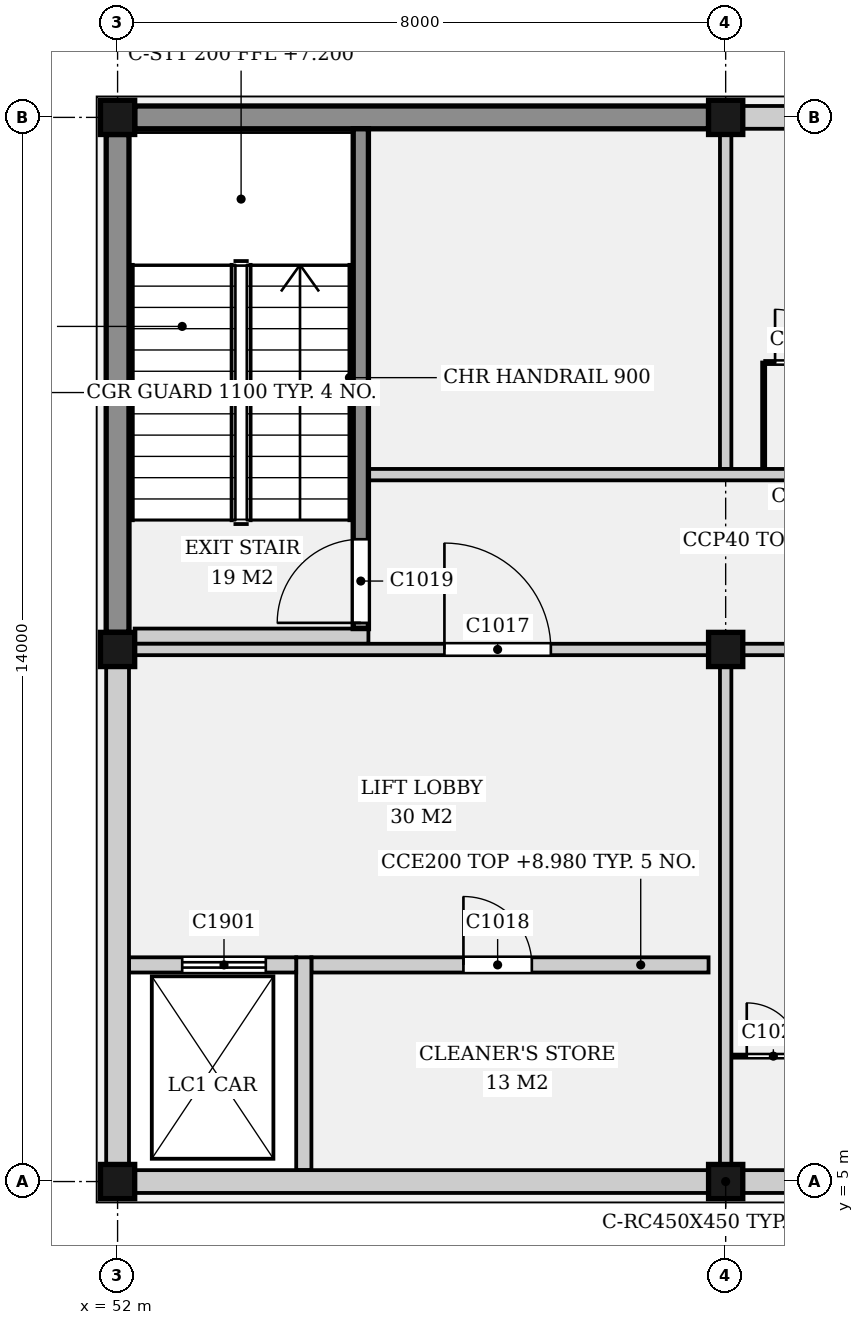
"""IFC4 building model, lengths in metres.
Left out: names, types, materials, properties, quantities, classifications, styles, units other than length and angle.
Written with IfcOpenShell. Run it as: python <this file> out.ifc"""

import sys

from ifc_helpers import new_model, si_unit, direction, frame, frame_2d, origin, origin_2d, place, context, subcontext, project, spatial, rectangle, extrude, element, fill, save


model = new_model("IFC4")
c1 = context("Model", 3, precision=1e-05, world=origin(), true_north=direction((0.0, 1.0)))
c2 = subcontext(c1, "Body", "Model", "MODEL_VIEW")
j1 = project(units=[si_unit("LENGTHUNIT", "METRE"), si_unit("PLANEANGLEUNIT", "RADIAN")], contexts=[c1])
p1 = place(None, origin())
s1 = spatial("IfcSite", under=j1, at=p1, CompositionType="ELEMENT")
p2 = place(p1, origin())
s2 = spatial("IfcBuilding", under=s1, at=p2, CompositionType="ELEMENT")
p3 = place(p2, frame((0.0, 0.0, 5.0)))
s3 = spatial("IfcBuildingStorey", under=s2, at=p3, CompositionType="ELEMENT", Elevation=5.0)
for number, where, z_axis, x_axis in (
    (1, (52.0, 5.0, 0.0), (0.0, 0.0, 1.0), (1.0, 0.0, 0.0)),
    (2, (52.0, 12.0, 0.0), (0.0, 0.0, 1.0), (1.0, 0.0, 0.0)),
    (3, (52.0, 19.0, 0.0), (0.0, 0.0, 1.0), (1.0, 0.0, 0.0)),
    (4, (60.0, 5.0, 0.0), (0.0, 0.0, 1.0), (1.0, 0.0, 0.0)),
    (5, (60.0, 12.0, 0.0), (0.0, 0.0, 1.0), (1.0, 0.0, 0.0)),
    (6, (60.0, 19.0, 0.0), (0.0, 0.0, 1.0), (1.0, 0.0, 0.0)),
):
    element("IfcColumn", number, at=place(p3, frame(where, z_axis=z_axis, x_axis=x_axis)), inside=s3, PredefinedType="COLUMN", context=c2, shape_type="SweptSolid", body=[
        extrude(rectangle(XDim=0.45, YDim=0.45, at=origin_2d()), origin(), (0.0, 0.0, 1.0), 4.4),
    ])
p4 = place(p3, frame((52.225, 5.0, 0.0), z_axis=(0.0, 0.0, 1.0), x_axis=(1.0, 0.0, 0.0)))
e7 = element("IfcWall", 7, at=p4, inside=s3, PredefinedType="ELEMENTEDWALL", context=c2, shape_type="SweptSolid", body=[
    extrude(rectangle(XDim=7.55, YDim=0.3, at=frame_2d((3.775, 0.0))), origin(), (0.0, 0.0, 1.0), 3.98),
])
p5 = place(p3, frame((60.225, 5.0, 0.0), z_axis=(0.0, 0.0, 1.0), x_axis=(1.0, 0.0, 0.0)))
e8 = element("IfcWall", 8, at=p5, inside=s3, PredefinedType="ELEMENTEDWALL", context=c2, shape_type="SweptSolid", body=[
    extrude(rectangle(XDim=11.55, YDim=0.3, at=frame_2d((5.775, 0.0))), origin(), (0.0, 0.0, 1.0), 3.98),
])
p6 = place(p5, frame((1.458, 0.0, 1.4)))
e9 = element("IfcOpeningElement", 9, at=p6, cuts=e8, PredefinedType="OPENING", context=c2, shape_type="SweptSolid", body=[
    extrude(rectangle(XDim=1.6, YDim=1.2, at=frame_2d((0.8, 0.6))), frame((0.0, 0.16, 0.0), z_axis=(0.0, -1.0, 0.0), x_axis=(1.0, 0.0, 0.0)), (0.0, 0.0, 1.0), 0.32),
])
p7 = place(p5, frame((4.975, 0.0, 1.4)))
e10 = element("IfcOpeningElement", 10, at=p7, cuts=e8, PredefinedType="OPENING", context=c2, shape_type="SweptSolid", body=[
    extrude(rectangle(XDim=1.6, YDim=1.2, at=frame_2d((0.8, 0.6))), frame((0.0, 0.16, 0.0), z_axis=(0.0, -1.0, 0.0), x_axis=(1.0, 0.0, 0.0)), (0.0, 0.0, 1.0), 0.32),
])
p8 = place(p5, frame((8.492, 0.0, 1.4)))
e11 = element("IfcOpeningElement", 11, at=p8, cuts=e8, PredefinedType="OPENING", context=c2, shape_type="SweptSolid", body=[
    extrude(rectangle(XDim=1.6, YDim=1.2, at=frame_2d((0.8, 0.6))), frame((0.0, 0.16, 0.0), z_axis=(0.0, -1.0, 0.0), x_axis=(1.0, 0.0, 0.0)), (0.0, 0.0, 1.0), 0.32),
])
p9 = place(p3, frame((52.225, 19.0, 0.0), z_axis=(0.0, 0.0, 1.0), x_axis=(1.0, 0.0, 0.0)))
e12 = element("IfcWall", 12, at=p9, inside=s3, PredefinedType="ELEMENTEDWALL", context=c2, shape_type="SweptSolid", body=[
    extrude(rectangle(XDim=7.55, YDim=0.3, at=frame_2d((3.775, 0.0))), origin(), (0.0, 0.0, 1.0), 3.98),
])
p10 = place(p3, frame((60.225, 19.0, 0.0), z_axis=(0.0, 0.0, 1.0), x_axis=(1.0, 0.0, 0.0)))
e13 = element("IfcWall", 13, at=p10, inside=s3, PredefinedType="ELEMENTEDWALL", context=c2, shape_type="SweptSolid", body=[
    extrude(rectangle(XDim=11.55, YDim=0.3, at=frame_2d((5.775, 0.0))), origin(), (0.0, 0.0, 1.0), 3.98),
])
p11 = place(p10, frame((1.458, 0.0, 1.4)))
e14 = element("IfcOpeningElement", 14, at=p11, cuts=e13, PredefinedType="OPENING", context=c2, shape_type="SweptSolid", body=[
    extrude(rectangle(XDim=1.6, YDim=1.2, at=frame_2d((0.8, 0.6))), frame((0.0, 0.16, 0.0), z_axis=(0.0, -1.0, 0.0), x_axis=(1.0, 0.0, 0.0)), (0.0, 0.0, 1.0), 0.32),
])
p12 = place(p10, frame((4.975, 0.0, 1.4)))
e15 = element("IfcOpeningElement", 15, at=p12, cuts=e13, PredefinedType="OPENING", context=c2, shape_type="SweptSolid", body=[
    extrude(rectangle(XDim=1.6, YDim=1.2, at=frame_2d((0.8, 0.6))), frame((0.0, 0.16, 0.0), z_axis=(0.0, -1.0, 0.0), x_axis=(1.0, 0.0, 0.0)), (0.0, 0.0, 1.0), 0.32),
])
p13 = place(p10, frame((8.492, 0.0, 1.4)))
e16 = element("IfcOpeningElement", 16, at=p13, cuts=e13, PredefinedType="OPENING", context=c2, shape_type="SweptSolid", body=[
    extrude(rectangle(XDim=1.6, YDim=1.2, at=frame_2d((0.8, 0.6))), frame((0.0, 0.16, 0.0), z_axis=(0.0, -1.0, 0.0), x_axis=(1.0, 0.0, 0.0)), (0.0, 0.0, 1.0), 0.32),
])
for number, where, z_axis, x_axis in (
    (17, (52.0, 5.225, 0.0), (0.0, 0.0, 1.0), (0.0, 1.0, 0.0)),
    (18, (52.0, 12.225, 0.0), (0.0, 0.0, 1.0), (0.0, 1.0, 0.0)),
):
    element("IfcWall", number, at=place(p3, frame(where, z_axis=z_axis, x_axis=x_axis)), inside=s3, PredefinedType="ELEMENTEDWALL", context=c2, shape_type="SweptSolid", body=[
        extrude(rectangle(XDim=6.55, YDim=0.3, at=frame_2d((3.275, 0.0))), origin(), (0.0, 0.0, 1.0), 3.98),
    ])
p14 = place(p3, frame((54.45, 5.15, 0.0), z_axis=(0.0, 0.0, 1.0), x_axis=(0.0, 1.0, 0.0)))
e19 = element("IfcWall", 19, at=p14, inside=s3, PredefinedType="SOLIDWALL", context=c2, shape_type="SweptSolid", body=[
    extrude(rectangle(XDim=2.8, YDim=0.2, at=frame_2d((1.4, 0.0))), origin(), (0.0, 0.0, 1.0), 3.98),
])
p15 = place(p3, frame((52.15, 7.85, 0.0), z_axis=(0.0, 0.0, 1.0), x_axis=(1.0, 0.0, 0.0)))
e20 = element("IfcWall", 20, at=p15, inside=s3, PredefinedType="SOLIDWALL", context=c2, shape_type="SweptSolid", body=[
    extrude(rectangle(XDim=2.2, YDim=0.2, at=frame_2d((1.1, 0.0))), origin(), (0.0, 0.0, 1.0), 3.98),
])
p16 = place(p15, frame((0.7, 0.0, 0.0)))
e21 = element("IfcOpeningElement", 21, at=p16, cuts=e20, PredefinedType="OPENING", context=c2, shape_type="SweptSolid", body=[
    extrude(rectangle(XDim=1.1, YDim=2.1, at=frame_2d((0.55, 1.05))), frame((0.0, 0.11, 0.0), z_axis=(0.0, -1.0, 0.0), x_axis=(1.0, 0.0, 0.0)), (0.0, 0.0, 1.0), 0.22),
])
p17 = place(p3, frame((52.225, 12.0, 0.0), z_axis=(0.0, 0.0, 1.0), x_axis=(1.0, 0.0, 0.0)))
e22 = element("IfcWall", 22, at=p17, inside=s3, PredefinedType="PARTITIONING", context=c2, shape_type="SweptSolid", body=[
    extrude(rectangle(XDim=7.55, YDim=0.15, at=frame_2d((3.775, 0.0))), origin(), (0.0, 0.0, 1.0), 3.98),
])
p18 = place(p17, frame((4.075, 0.0, 0.0)))
e23 = element("IfcOpeningElement", 23, at=p18, cuts=e22, PredefinedType="OPENING", context=c2, shape_type="SweptSolid", body=[
    extrude(rectangle(XDim=1.4, YDim=2.1, at=frame_2d((0.7, 1.05))), frame((0.0, 0.085, 0.0), z_axis=(0.0, -1.0, 0.0), x_axis=(1.0, 0.0, 0.0)), (0.0, 0.0, 1.0), 0.17),
])
p19 = place(p3, frame((60.225, 12.0, 0.0), z_axis=(0.0, 0.0, 1.0), x_axis=(1.0, 0.0, 0.0)))
e24 = element("IfcWall", 24, at=p19, inside=s3, PredefinedType="PARTITIONING", context=c2, shape_type="SweptSolid", body=[
    extrude(rectangle(XDim=11.55, YDim=0.15, at=frame_2d((5.775, 0.0))), origin(), (0.0, 0.0, 1.0), 3.98),
])
p20 = place(p3, frame((55.3, 14.3, 0.0), z_axis=(0.0, 0.0, 1.0), x_axis=(1.0, 0.0, 0.0)))
e25 = element("IfcWall", 25, at=p20, inside=s3, PredefinedType="PARTITIONING", context=c2, shape_type="SweptSolid", body=[
    extrude(rectangle(XDim=93.4, YDim=0.15, at=frame_2d((46.7, 0.0))), origin(), (0.0, 0.0, 1.0), 3.98),
])
p21 = place(p20, frame((15.8, 0.0, 0.0)))
e26 = element("IfcOpeningElement", 26, at=p21, cuts=e25, PredefinedType="OPENING", context=c2, shape_type="SweptSolid", body=[
    extrude(rectangle(XDim=1.8, YDim=2.4, at=frame_2d((0.9, 1.2))), frame((0.0, 0.085, 0.0), z_axis=(0.0, -1.0, 0.0), x_axis=(1.0, 0.0, 0.0)), (0.0, 0.0, 1.0), 0.17),
])
p22 = place(p20, frame((32.2, 0.0, 0.0)))
e27 = element("IfcOpeningElement", 27, at=p22, cuts=e25, PredefinedType="OPENING", context=c2, shape_type="SweptSolid", body=[
    extrude(rectangle(XDim=1.0, YDim=2.1, at=frame_2d((0.5, 1.05))), frame((0.0, 0.085, 0.0), z_axis=(0.0, -1.0, 0.0), x_axis=(1.0, 0.0, 0.0)), (0.0, 0.0, 1.0), 0.17),
])
p23 = place(p20, frame((38.2, 0.0, 0.0)))
e28 = element("IfcOpeningElement", 28, at=p23, cuts=e25, PredefinedType="OPENING", context=c2, shape_type="SweptSolid", body=[
    extrude(rectangle(XDim=1.0, YDim=2.1, at=frame_2d((0.5, 1.05))), frame((0.0, 0.085, 0.0), z_axis=(0.0, -1.0, 0.0), x_axis=(1.0, 0.0, 0.0)), (0.0, 0.0, 1.0), 0.17),
])
p24 = place(p20, frame((45.7, 0.0, 0.0)))
e29 = element("IfcOpeningElement", 29, at=p24, cuts=e25, PredefinedType="OPENING", context=c2, shape_type="SweptSolid", body=[
    extrude(rectangle(XDim=0.9, YDim=2.1, at=frame_2d((0.45, 1.05))), frame((0.0, 0.085, 0.0), z_axis=(0.0, -1.0, 0.0), x_axis=(1.0, 0.0, 0.0)), (0.0, 0.0, 1.0), 0.17),
])
p25 = place(p20, frame((58.2, 0.0, 0.0)))
e30 = element("IfcOpeningElement", 30, at=p25, cuts=e25, PredefinedType="OPENING", context=c2, shape_type="SweptSolid", body=[
    extrude(rectangle(XDim=1.0, YDim=2.1, at=frame_2d((0.5, 1.05))), frame((0.0, 0.085, 0.0), z_axis=(0.0, -1.0, 0.0), x_axis=(1.0, 0.0, 0.0)), (0.0, 0.0, 1.0), 0.17),
])
p26 = place(p20, frame((70.2, 0.0, 0.0)))
e31 = element("IfcOpeningElement", 31, at=p26, cuts=e25, PredefinedType="OPENING", context=c2, shape_type="SweptSolid", body=[
    extrude(rectangle(XDim=1.0, YDim=2.1, at=frame_2d((0.5, 1.05))), frame((0.0, 0.085, 0.0), z_axis=(0.0, -1.0, 0.0), x_axis=(1.0, 0.0, 0.0)), (0.0, 0.0, 1.0), 0.17),
])
p27 = place(p20, frame((81.68, 0.0, 0.0)))
e32 = element("IfcOpeningElement", 32, at=p27, cuts=e25, PredefinedType="OPENING", context=c2, shape_type="SweptSolid", body=[
    extrude(rectangle(XDim=0.9, YDim=2.1, at=frame_2d((0.45, 1.05))), frame((0.0, 0.085, 0.0), z_axis=(0.0, -1.0, 0.0), x_axis=(1.0, 0.0, 0.0)), (0.0, 0.0, 1.0), 0.17),
])
p28 = place(p3, frame((60.0, 5.225, 0.0), z_axis=(0.0, 0.0, 1.0), x_axis=(0.0, 1.0, 0.0)))
e33 = element("IfcWall", 33, at=p28, inside=s3, PredefinedType="PARTITIONING", context=c2, shape_type="SweptSolid", body=[
    extrude(rectangle(XDim=6.55, YDim=0.15, at=frame_2d((3.275, 0.0))), origin(), (0.0, 0.0, 1.0), 3.98),
])
p29 = place(p3, frame((60.0, 14.375, 0.0), z_axis=(0.0, 0.0, 1.0), x_axis=(0.0, 1.0, 0.0)))
e34 = element("IfcWall", 34, at=p29, inside=s3, PredefinedType="PARTITIONING", context=c2, shape_type="SweptSolid", body=[
    extrude(rectangle(XDim=4.4, YDim=0.15, at=frame_2d((2.2, 0.0))), origin(), (0.0, 0.0, 1.0), 3.98),
])
p30 = place(p3, frame((54.55, 7.85, 0.0), z_axis=(0.0, 0.0, 1.0), x_axis=(1.0, 0.0, 0.0)))
e35 = element("IfcWall", 35, at=p30, inside=s3, PredefinedType="SOLIDWALL", context=c2, shape_type="SweptSolid", body=[
    extrude(rectangle(XDim=5.225, YDim=0.2, at=frame_2d((2.612, 0.0))), origin(), (0.0, 0.0, 1.0), 3.98),
])
p31 = place(p30, frame((2.0, 0.0, 0.0)))
e36 = element("IfcOpeningElement", 36, at=p31, cuts=e35, PredefinedType="OPENING", context=c2, shape_type="SweptSolid", body=[
    extrude(rectangle(XDim=0.9, YDim=2.1, at=frame_2d((0.45, 1.05))), frame((0.0, 0.11, 0.0), z_axis=(0.0, -1.0, 0.0), x_axis=(1.0, 0.0, 0.0)), (0.0, 0.0, 1.0), 0.22),
])
p32 = place(p3, frame((55.2, 12.275, 0.0), z_axis=(0.0, 0.0, 1.0), x_axis=(0.0, 1.0, 0.0)))
e37 = element("IfcWall", 37, at=p32, inside=s3, PredefinedType="SOLIDWALL", context=c2, shape_type="SweptSolid", body=[
    extrude(rectangle(XDim=6.575, YDim=0.2, at=frame_2d((3.288, 0.0))), origin(), (0.0, 0.0, 1.0), 3.98),
])
p33 = place(p32, frame((0.075, 0.0, 0.0)))
e38 = element("IfcOpeningElement", 38, at=p33, cuts=e37, PredefinedType="OPENING", context=c2, shape_type="SweptSolid", body=[
    extrude(rectangle(XDim=1.1, YDim=2.1, at=frame_2d((0.55, 1.05))), frame((0.0, 0.11, 0.0), z_axis=(0.0, -1.0, 0.0), x_axis=(1.0, 0.0, 0.0)), (0.0, 0.0, 1.0), 0.22),
])
p34 = place(p3, frame((52.225, 12.175, 0.0), z_axis=(0.0, 0.0, 1.0), x_axis=(1.0, 0.0, 0.0)))
e39 = element("IfcWall", 39, at=p34, inside=s3, PredefinedType="SOLIDWALL", context=c2, shape_type="SweptSolid", body=[
    extrude(rectangle(XDim=3.075, YDim=0.2, at=frame_2d((1.538, 0.0))), origin(), (0.0, 0.0, 1.0), 3.98),
])
p35 = place(p3, frame((60.075, 6.65, 0.0), z_axis=(0.0, 0.0, 1.0), x_axis=(1.0, 0.0, 0.0)))
e40 = element("IfcWall", 40, at=p35, inside=s3, PredefinedType="PARTITIONING", context=c2, shape_type="SweptSolid", body=[
    extrude(rectangle(XDim=1.105, YDim=0.04, at=frame_2d((0.552, 0.0))), origin(), (0.0, 0.0, 1.0), 2.4),
])
p36 = place(p35, frame((0.202, 0.0, 0.0)))
e41 = element("IfcOpeningElement", 41, at=p36, cuts=e40, PredefinedType="OPENING", context=c2, shape_type="SweptSolid", body=[
    extrude(rectangle(XDim=0.7, YDim=2.0, at=frame_2d((0.35, 1.0))), frame((0.0, 0.03, 0.0), z_axis=(0.0, -1.0, 0.0), x_axis=(1.0, 0.0, 0.0)), (0.0, 0.0, 1.0), 0.06),
])
p37 = place(p3, frame((60.5, 14.375, 0.0), z_axis=(0.0, 0.0, 1.0), x_axis=(0.0, 1.0, 0.0)))
e42 = element("IfcWall", 42, at=p37, inside=s3, PredefinedType="PARTITIONING", context=c2, shape_type="SweptSolid", body=[
    extrude(rectangle(XDim=1.4, YDim=0.04, at=frame_2d((0.7, 0.0))), origin(), (0.0, 0.0, 1.0), 2.4),
])
p38 = place(p3, frame((60.52, 15.775, 0.0), z_axis=(0.0, 0.0, 1.0), x_axis=(1.0, 0.0, 0.0)))
e43 = element("IfcWall", 43, at=p38, inside=s3, PredefinedType="PARTITIONING", context=c2, shape_type="SweptSolid", body=[
    extrude(rectangle(XDim=0.96, YDim=0.04, at=frame_2d((0.48, 0.0))), origin(), (0.0, 0.0, 1.0), 2.4),
])
p39 = place(p38, frame((0.13, 0.0, 0.0)))
e44 = element("IfcOpeningElement", 44, at=p39, cuts=e43, PredefinedType="OPENING", context=c2, shape_type="SweptSolid", body=[
    extrude(rectangle(XDim=0.7, YDim=2.0, at=frame_2d((0.35, 1.0))), frame((0.0, 0.03, 0.0), z_axis=(0.0, -1.0, 0.0), x_axis=(1.0, 0.0, 0.0)), (0.0, 0.0, 1.0), 0.06),
])
p40 = place(p16, origin())
e45 = element("IfcDoor", 45, at=p40, inside=s3, OperationType="SLIDING_TO_LEFT", PredefinedType="DOOR", context=c2, shape_type="SweptSolid", body=[
    extrude(rectangle(XDim=1.1, YDim=2.1, at=frame_2d((0.55, 1.05))), frame((0.0, 0.025, 0.0), z_axis=(0.0, -1.0, 0.0), x_axis=(1.0, 0.0, 0.0)), (0.0, 0.0, 1.0), 0.05),
])
fill(e21, e45)
p41 = place(p18, origin())
e46 = element("IfcDoor", 46, at=p41, inside=s3, OperationType="SINGLE_SWING_LEFT", PredefinedType="DOOR", context=c2, shape_type="SweptSolid", body=[
    extrude(rectangle(XDim=1.4, YDim=2.1, at=frame_2d((0.7, 1.05))), frame((0.0, 0.025, 0.0), z_axis=(0.0, -1.0, 0.0), x_axis=(1.0, 0.0, 0.0)), (0.0, 0.0, 1.0), 0.05),
])
fill(e23, e46)
p42 = place(p31, origin())
e47 = element("IfcDoor", 47, at=p42, inside=s3, OperationType="SINGLE_SWING_LEFT", PredefinedType="DOOR", context=c2, shape_type="SweptSolid", body=[
    extrude(rectangle(XDim=0.9, YDim=2.1, at=frame_2d((0.45, 1.05))), frame((0.0, 0.025, 0.0), z_axis=(0.0, -1.0, 0.0), x_axis=(1.0, 0.0, 0.0)), (0.0, 0.0, 1.0), 0.05),
])
fill(e36, e47)
p43 = place(p33, origin())
e48 = element("IfcDoor", 48, at=p43, inside=s3, OperationType="SINGLE_SWING_LEFT", PredefinedType="DOOR", context=c2, shape_type="SweptSolid", body=[
    extrude(rectangle(XDim=1.1, YDim=2.1, at=frame_2d((0.55, 1.05))), frame((0.0, 0.025, 0.0), z_axis=(0.0, -1.0, 0.0), x_axis=(1.0, 0.0, 0.0)), (0.0, 0.0, 1.0), 0.05),
])
fill(e38, e48)
p44 = place(p36, origin())
e49 = element("IfcDoor", 49, at=p44, inside=s3, OperationType="SINGLE_SWING_LEFT", PredefinedType="DOOR", context=c2, shape_type="SweptSolid", body=[
    extrude(rectangle(XDim=0.7, YDim=2.0, at=frame_2d((0.35, 1.0))), frame((0.0, 0.02, 0.0), z_axis=(0.0, -1.0, 0.0), x_axis=(1.0, 0.0, 0.0)), (0.0, 0.0, 1.0), 0.04),
])
fill(e41, e49)
p45 = place(p39, origin())
e50 = element("IfcDoor", 50, at=p45, inside=s3, OperationType="SINGLE_SWING_LEFT", PredefinedType="DOOR", context=c2, shape_type="SweptSolid", body=[
    extrude(rectangle(XDim=0.7, YDim=2.0, at=frame_2d((0.35, 1.0))), frame((0.0, 0.02, 0.0), z_axis=(0.0, -1.0, 0.0), x_axis=(1.0, 0.0, 0.0)), (0.0, 0.0, 1.0), 0.04),
])
fill(e44, e50)
save(model, sys.argv[1])
